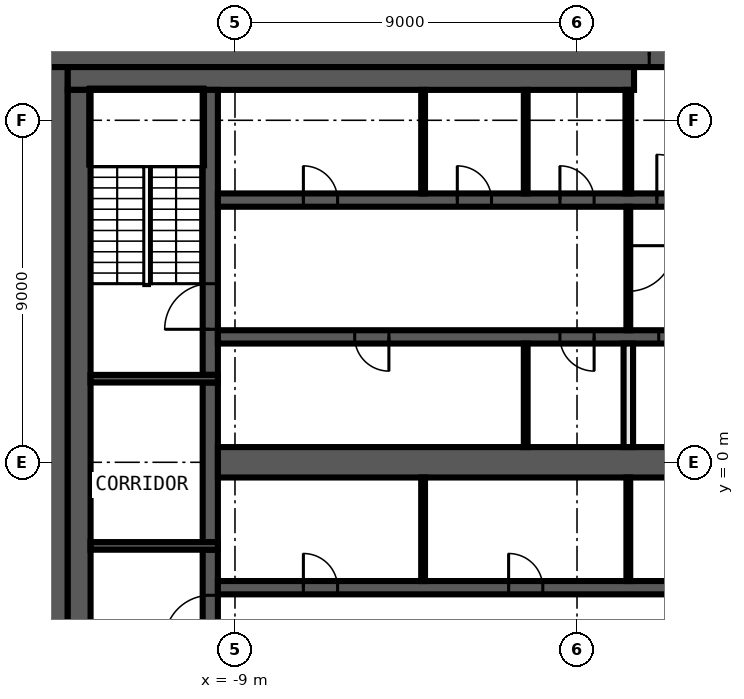
"""IFC4 building model, lengths in metres.
Left out: names, types, materials, properties, quantities, classifications, styles, units other than length and angle.
Written with IfcOpenShell. Run it as: python <this file> out.ifc"""

import sys

from ifc_helpers import new_model, si_unit, direction, frame, frame_2d, origin, place, context, subcontext, project, spatial, rectangle, extrude, element, fill, save


model = new_model("IFC4")
c1 = context("Model", 3, precision=1e-05, world=origin(), true_north=direction((0.0, 1.0)))
c2 = subcontext(c1, "Body", "Model", "MODEL_VIEW")
j1 = project(units=[si_unit("LENGTHUNIT", "METRE"), si_unit("PLANEANGLEUNIT", "RADIAN")], contexts=[c1])
p1 = place(None, origin())
s1 = spatial("IfcSite", under=j1, at=p1, CompositionType="ELEMENT")
p2 = place(p1, origin())
s2 = spatial("IfcBuilding", under=s1, at=p2, CompositionType="ELEMENT")
p3 = place(p2, frame((0.0, 0.0, 323.6)))
s3 = spatial("IfcBuildingStorey", under=s2, at=p3, CompositionType="ELEMENT", Elevation=323.6)
p4 = place(p3, frame((-14.0, 10.7, 0.0), z_axis=(0.0, 0.0, 1.0), x_axis=(1.0, 0.0, 0.0)))
e1 = element("IfcWall", 1, at=p4, inside=s3, PredefinedType="SHEAR", context=c2, shape_type="SweptSolid", body=[
    extrude(rectangle(XDim=28.0, YDim=0.6, at=frame_2d((14.0, 0.0))), origin(), (0.0, 0.0, 1.0), 3.82),
])
p5 = place(p4, frame((15.9, 0.0, 0.0)))
e2 = element("IfcOpeningElement", 2, at=p5, cuts=e1, PredefinedType="OPENING", context=c2, shape_type="SweptSolid", body=[
    extrude(rectangle(XDim=1.6, YDim=2.1, at=frame_2d((0.8, 1.05))), frame((0.0, 0.31, 0.0), z_axis=(0.0, -1.0, 0.0), x_axis=(1.0, 0.0, 0.0)), (0.0, 0.0, 1.0), 0.62),
])
p6 = place(p3, frame((-13.7, -10.4, 0.0), z_axis=(0.0, 0.0, 1.0), x_axis=(0.0, 1.0, 0.0)))
e3 = element("IfcWall", 3, at=p6, inside=s3, PredefinedType="SHEAR", context=c2, shape_type="SweptSolid", body=[
    extrude(rectangle(XDim=20.8, YDim=0.6, at=frame_2d((10.4, 0.0))), origin(), (0.0, 0.0, 1.0), 3.82),
])
p7 = place(p3, frame((-13.4, 10.1, 0.0), z_axis=(0.0, 0.0, 1.0), x_axis=(1.0, 0.0, 0.0)))
e4 = element("IfcWall", 4, at=p7, inside=s3, PredefinedType="SHEAR", context=c2, shape_type="SweptSolid", body=[
    extrude(rectangle(XDim=14.9, YDim=0.6, at=frame_2d((7.45, 0.0))), origin(), (0.0, 0.0, 1.0), 3.82),
])
p8 = place(p3, frame((-13.1, -9.8, 0.0), z_axis=(0.0, 0.0, 1.0), x_axis=(0.0, 1.0, 0.0)))
e5 = element("IfcWall", 5, at=p8, inside=s3, PredefinedType="SHEAR", context=c2, shape_type="SweptSolid", body=[
    extrude(rectangle(XDim=19.6, YDim=0.6, at=frame_2d((9.8, 0.0))), origin(), (0.0, 0.0, 1.0), 3.82),
])
p9 = place(p3, frame((-9.65, -9.8, 0.0), z_axis=(0.0, 0.0, 1.0), x_axis=(0.0, 1.0, 0.0)))
e6 = element("IfcWall", 6, at=p9, inside=s3, PredefinedType="SHEAR", context=c2, shape_type="SweptSolid", body=[
    extrude(rectangle(XDim=7.5, YDim=0.4, at=frame_2d((3.75, 0.0))), origin(), (0.0, 0.0, 1.0), 3.82),
])
p10 = place(p9, frame((5.1, 0.0, 0.0)))
e7 = element("IfcOpeningElement", 7, at=p10, cuts=e6, PredefinedType="OPENING", context=c2, shape_type="SweptSolid", body=[
    extrude(rectangle(XDim=1.2, YDim=2.1, at=frame_2d((0.6, 1.05))), frame((0.0, 0.21, 0.0), z_axis=(0.0, -1.0, 0.0), x_axis=(1.0, 0.0, 0.0)), (0.0, 0.0, 1.0), 0.42),
])
p11 = place(p3, frame((-9.65, -2.1, 0.0), z_axis=(0.0, 0.0, 1.0), x_axis=(0.0, 1.0, 0.0)))
e8 = element("IfcWall", 8, at=p11, inside=s3, PredefinedType="SHEAR", context=c2, shape_type="SweptSolid", body=[
    extrude(rectangle(XDim=4.2, YDim=0.4, at=frame_2d((2.1, 0.0))), origin(), (0.0, 0.0, 1.0), 3.82),
])
p12 = place(p3, frame((-9.65, 2.3, 0.0), z_axis=(0.0, 0.0, 1.0), x_axis=(0.0, 1.0, 0.0)))
e9 = element("IfcWall", 9, at=p12, inside=s3, PredefinedType="SHEAR", context=c2, shape_type="SweptSolid", body=[
    extrude(rectangle(XDim=7.5, YDim=0.4, at=frame_2d((3.75, 0.0))), origin(), (0.0, 0.0, 1.0), 3.82),
])
p13 = place(p12, frame((1.2, 0.0, 0.0)))
e10 = element("IfcOpeningElement", 10, at=p13, cuts=e9, PredefinedType="OPENING", context=c2, shape_type="SweptSolid", body=[
    extrude(rectangle(XDim=1.2, YDim=2.1, at=frame_2d((0.6, 1.05))), frame((0.0, 0.21, 0.0), z_axis=(0.0, -1.0, 0.0), x_axis=(1.0, 0.0, 0.0)), (0.0, 0.0, 1.0), 0.42),
])
for number, where, z_axis, x_axis in (
    (11, (-9.45, 2.2, 0.0), (0.0, 0.0, 1.0), (-1.0, 0.0, 0.0)),
    (12, (-9.45, -2.2, 0.0), (0.0, 0.0, 1.0), (-1.0, 0.0, 0.0)),
):
    element("IfcWall", number, at=place(p3, frame(where, z_axis=z_axis, x_axis=x_axis)), inside=s3, PredefinedType="SHEAR", context=c2, shape_type="SweptSolid", body=[
        extrude(rectangle(XDim=3.35, YDim=0.2, at=frame_2d((1.675, 0.0))), origin(), (0.0, 0.0, 1.0), 3.82),
    ])
p14 = place(p3, frame((-9.45, 6.9, 0.0), z_axis=(0.0, 0.0, 1.0), x_axis=(1.0, 0.0, 0.0)))
e13 = element("IfcWall", 13, at=p14, inside=s3, PredefinedType="SHEAR", context=c2, shape_type="SweptSolid", body=[
    extrude(rectangle(XDim=18.9, YDim=0.35, at=frame_2d((9.45, 0.0))), origin(), (0.0, 0.0, 1.0), 3.82),
])
p15 = place(p14, frame((11.55, 0.0, 0.0)))
e14 = element("IfcOpeningElement", 14, at=p15, cuts=e13, PredefinedType="OPENING", context=c2, shape_type="SweptSolid", body=[
    extrude(rectangle(XDim=1.2, YDim=2.1, at=frame_2d((0.6, 1.05))), frame((0.0, 0.185, 0.0), z_axis=(0.0, -1.0, 0.0), x_axis=(1.0, 0.0, 0.0)), (0.0, 0.0, 1.0), 0.37),
])
p16 = place(p14, frame((14.3, 0.0, 0.0)))
e15 = element("IfcOpeningElement", 15, at=p16, cuts=e13, PredefinedType="OPENING", context=c2, shape_type="SweptSolid", body=[
    extrude(rectangle(XDim=1.1, YDim=2.1, at=frame_2d((0.55, 1.05))), frame((0.0, 0.185, 0.0), z_axis=(0.0, -1.0, 0.0), x_axis=(1.0, 0.0, 0.0)), (0.0, 0.0, 1.0), 0.37),
])
p17 = place(p14, frame((17.0, 0.0, 0.0)))
e16 = element("IfcOpeningElement", 16, at=p17, cuts=e13, PredefinedType="OPENING", context=c2, shape_type="SweptSolid", body=[
    extrude(rectangle(XDim=1.1, YDim=2.1, at=frame_2d((0.55, 1.05))), frame((0.0, 0.185, 0.0), z_axis=(0.0, -1.0, 0.0), x_axis=(1.0, 0.0, 0.0)), (0.0, 0.0, 1.0), 0.37),
])
p18 = place(p14, frame((2.25, 0.0, 0.0)))
e17 = element("IfcOpeningElement", 17, at=p18, cuts=e13, PredefinedType="OPENING", context=c2, shape_type="SweptSolid", body=[
    extrude(rectangle(XDim=0.9, YDim=2.1, at=frame_2d((0.45, 1.05))), frame((0.0, 0.185, 0.0), z_axis=(0.0, -1.0, 0.0), x_axis=(1.0, 0.0, 0.0)), (0.0, 0.0, 1.0), 0.37),
])
p19 = place(p14, frame((6.3, 0.0, 0.0)))
e18 = element("IfcOpeningElement", 18, at=p19, cuts=e13, PredefinedType="OPENING", context=c2, shape_type="SweptSolid", body=[
    extrude(rectangle(XDim=0.9, YDim=2.1, at=frame_2d((0.45, 1.05))), frame((0.0, 0.185, 0.0), z_axis=(0.0, -1.0, 0.0), x_axis=(1.0, 0.0, 0.0)), (0.0, 0.0, 1.0), 0.37),
])
p20 = place(p14, frame((9.0, 0.0, 0.0)))
e19 = element("IfcOpeningElement", 19, at=p20, cuts=e13, PredefinedType="OPENING", context=c2, shape_type="SweptSolid", body=[
    extrude(rectangle(XDim=0.9, YDim=2.1, at=frame_2d((0.45, 1.05))), frame((0.0, 0.185, 0.0), z_axis=(0.0, -1.0, 0.0), x_axis=(1.0, 0.0, 0.0)), (0.0, 0.0, 1.0), 0.37),
])
p21 = place(p3, frame((9.45, 3.3, 0.0), z_axis=(0.0, 0.0, 1.0), x_axis=(-1.0, 0.0, 0.0)))
e20 = element("IfcWall", 20, at=p21, inside=s3, PredefinedType="SHEAR", context=c2, shape_type="SweptSolid", body=[
    extrude(rectangle(XDim=18.9, YDim=0.35, at=frame_2d((9.45, 0.0))), origin(), (0.0, 0.0, 1.0), 3.82),
])
p22 = place(p21, frame((6.2, 0.0, 0.0)))
e21 = element("IfcOpeningElement", 21, at=p22, cuts=e20, PredefinedType="OPENING", context=c2, shape_type="SweptSolid", body=[
    extrude(rectangle(XDim=1.1, YDim=2.1, at=frame_2d((0.55, 1.05))), frame((0.0, 0.185, 0.0), z_axis=(0.0, -1.0, 0.0), x_axis=(1.0, 0.0, 0.0)), (0.0, 0.0, 1.0), 0.37),
])
p23 = place(p21, frame((3.5, 0.0, 0.0)))
e22 = element("IfcOpeningElement", 22, at=p23, cuts=e20, PredefinedType="OPENING", context=c2, shape_type="SweptSolid", body=[
    extrude(rectangle(XDim=1.1, YDim=2.1, at=frame_2d((0.55, 1.05))), frame((0.0, 0.185, 0.0), z_axis=(0.0, -1.0, 0.0), x_axis=(1.0, 0.0, 0.0)), (0.0, 0.0, 1.0), 0.37),
])
p24 = place(p21, frame((0.9, 0.0, 0.0)))
e23 = element("IfcOpeningElement", 23, at=p24, cuts=e20, PredefinedType="OPENING", context=c2, shape_type="SweptSolid", body=[
    extrude(rectangle(XDim=0.9, YDim=2.1, at=frame_2d((0.45, 1.05))), frame((0.0, 0.185, 0.0), z_axis=(0.0, -1.0, 0.0), x_axis=(1.0, 0.0, 0.0)), (0.0, 0.0, 1.0), 0.37),
])
p25 = place(p21, frame((14.4, 0.0, 0.0)))
e24 = element("IfcOpeningElement", 24, at=p25, cuts=e20, PredefinedType="OPENING", context=c2, shape_type="SweptSolid", body=[
    extrude(rectangle(XDim=0.9, YDim=2.1, at=frame_2d((0.45, 1.05))), frame((0.0, 0.185, 0.0), z_axis=(0.0, -1.0, 0.0), x_axis=(1.0, 0.0, 0.0)), (0.0, 0.0, 1.0), 0.37),
])
p26 = place(p21, frame((9.0, 0.0, 0.0)))
e25 = element("IfcOpeningElement", 25, at=p26, cuts=e20, PredefinedType="OPENING", context=c2, shape_type="SweptSolid", body=[
    extrude(rectangle(XDim=0.9, YDim=2.1, at=frame_2d((0.45, 1.05))), frame((0.0, 0.185, 0.0), z_axis=(0.0, -1.0, 0.0), x_axis=(1.0, 0.0, 0.0)), (0.0, 0.0, 1.0), 0.37),
])
p27 = place(p3, frame((-9.45, -3.3, 0.0), z_axis=(0.0, 0.0, 1.0), x_axis=(1.0, 0.0, 0.0)))
e26 = element("IfcWall", 26, at=p27, inside=s3, PredefinedType="SHEAR", context=c2, shape_type="SweptSolid", body=[
    extrude(rectangle(XDim=18.9, YDim=0.35, at=frame_2d((9.45, 0.0))), origin(), (0.0, 0.0, 1.0), 3.82),
])
p28 = place(p27, frame((17.0, 0.0, 0.0)))
e27 = element("IfcOpeningElement", 27, at=p28, cuts=e26, PredefinedType="OPENING", context=c2, shape_type="SweptSolid", body=[
    extrude(rectangle(XDim=1.1, YDim=2.1, at=frame_2d((0.55, 1.05))), frame((0.0, 0.185, 0.0), z_axis=(0.0, -1.0, 0.0), x_axis=(1.0, 0.0, 0.0)), (0.0, 0.0, 1.0), 0.37),
])
p29 = place(p27, frame((2.25, 0.0, 0.0)))
e28 = element("IfcOpeningElement", 28, at=p29, cuts=e26, PredefinedType="OPENING", context=c2, shape_type="SweptSolid", body=[
    extrude(rectangle(XDim=0.9, YDim=2.1, at=frame_2d((0.45, 1.05))), frame((0.0, 0.185, 0.0), z_axis=(0.0, -1.0, 0.0), x_axis=(1.0, 0.0, 0.0)), (0.0, 0.0, 1.0), 0.37),
])
p30 = place(p27, frame((7.65, 0.0, 0.0)))
e29 = element("IfcOpeningElement", 29, at=p30, cuts=e26, PredefinedType="OPENING", context=c2, shape_type="SweptSolid", body=[
    extrude(rectangle(XDim=0.9, YDim=2.1, at=frame_2d((0.45, 1.05))), frame((0.0, 0.185, 0.0), z_axis=(0.0, -1.0, 0.0), x_axis=(1.0, 0.0, 0.0)), (0.0, 0.0, 1.0), 0.37),
])
p31 = place(p27, frame((13.05, 0.0, 0.0)))
e30 = element("IfcOpeningElement", 30, at=p31, cuts=e26, PredefinedType="OPENING", context=c2, shape_type="SweptSolid", body=[
    extrude(rectangle(XDim=0.9, YDim=2.1, at=frame_2d((0.45, 1.05))), frame((0.0, 0.185, 0.0), z_axis=(0.0, -1.0, 0.0), x_axis=(1.0, 0.0, 0.0)), (0.0, 0.0, 1.0), 0.37),
])
p32 = place(p3, frame((-9.45, 0.0, 0.0), z_axis=(0.0, 0.0, 1.0), x_axis=(1.0, 0.0, 0.0)))
e31 = element("IfcWall", 31, at=p32, inside=s3, PredefinedType="SHEAR", context=c2, shape_type="SweptSolid", body=[
    extrude(rectangle(XDim=18.9, YDim=0.8, at=frame_2d((9.45, 0.0))), origin(), (0.0, 0.0, 1.0), 3.82),
])
p33 = place(p3, frame((1.35, 7.075, 0.0), z_axis=(0.0, 0.0, 1.0), x_axis=(0.0, 1.0, 0.0)))
e32 = element("IfcWall", 32, at=p33, inside=s3, PredefinedType="PARTITIONING", context=c2, shape_type="SweptSolid", body=[
    extrude(rectangle(XDim=2.725, YDim=0.15, at=frame_2d((1.363, 0.0))), origin(), (0.0, 0.0, 1.0), 3.82),
])
p34 = place(p3, frame((1.35, -3.125, 0.0), z_axis=(0.0, 0.0, 1.0), x_axis=(0.0, 1.0, 0.0)))
e33 = element("IfcWall", 33, at=p34, inside=s3, PredefinedType="PARTITIONING", context=c2, shape_type="SweptSolid", body=[
    extrude(rectangle(XDim=2.725, YDim=0.1, at=frame_2d((1.363, 0.0))), origin(), (0.0, 0.0, 1.0), 3.82),
])
p35 = place(p3, frame((1.35, 6.725, 0.0), z_axis=(0.0, 0.0, 1.0), x_axis=(0.0, -1.0, 0.0)))
e34 = element("IfcWall", 34, at=p35, inside=s3, PredefinedType="PARTITIONING", context=c2, shape_type="SweptSolid", body=[
    extrude(rectangle(XDim=3.25, YDim=0.1, at=frame_2d((1.625, 0.0))), origin(), (0.0, 0.0, 1.0), 3.82),
])
p36 = place(p35, frame((1.025, 0.0, 0.0)))
e35 = element("IfcOpeningElement", 35, at=p36, cuts=e34, PredefinedType="OPENING", context=c2, shape_type="SweptSolid", body=[
    extrude(rectangle(XDim=1.2, YDim=2.1, at=frame_2d((0.6, 1.05))), frame((0.0, 0.06, 0.0), z_axis=(0.0, -1.0, 0.0), x_axis=(1.0, 0.0, 0.0)), (0.0, 0.0, 1.0), 0.12),
])
p37 = place(p3, frame((1.35, 0.4, 0.0), z_axis=(0.0, 0.0, 1.0), x_axis=(0.0, 1.0, 0.0)))
e36 = element("IfcWall", 36, at=p37, inside=s3, PredefinedType="SOLIDWALL", context=c2, shape_type="SweptSolid", body=[
    extrude(rectangle(XDim=2.725, YDim=0.25, at=frame_2d((1.363, 0.0))), origin(), (0.0, 0.0, 1.0), 3.82),
])
for number, where, z_axis, x_axis in (
    (37, (-1.35, 0.4, 0.0), (0.0, 0.0, 1.0), (0.0, 1.0, 0.0)),
    (38, (-1.35, 7.075, 0.0), (0.0, 0.0, 1.0), (0.0, 1.0, 0.0)),
    (39, (-4.05, -3.125, 0.0), (0.0, 0.0, 1.0), (0.0, 1.0, 0.0)),
    (40, (-4.05, 7.075, 0.0), (0.0, 0.0, 1.0), (0.0, 1.0, 0.0)),
):
    element("IfcWall", number, at=place(p3, frame(where, z_axis=z_axis, x_axis=x_axis)), inside=s3, PredefinedType="PARTITIONING", context=c2, shape_type="SweptSolid", body=[
        extrude(rectangle(XDim=2.725, YDim=0.1, at=frame_2d((1.363, 0.0))), origin(), (0.0, 0.0, 1.0), 3.82),
    ])
p38 = place(p5, origin())
e41 = element("IfcDoor", 41, at=p38, inside=s3, OperationType="DOUBLE_DOOR_SINGLE_SWING", PredefinedType="DOOR", context=c2, shape_type="SweptSolid", body=[
    extrude(rectangle(XDim=1.6, YDim=2.1, at=frame_2d((0.8, 1.05))), frame((0.0, 0.025, 0.0), z_axis=(0.0, -1.0, 0.0), x_axis=(1.0, 0.0, 0.0)), (0.0, 0.0, 1.0), 0.05),
])
fill(e2, e41)
p39 = place(p15, origin())
e42 = element("IfcDoor", 42, at=p39, inside=s3, OperationType="SINGLE_SWING_LEFT", PredefinedType="DOOR", context=c2, shape_type="SweptSolid", body=[
    extrude(rectangle(XDim=1.2, YDim=2.1, at=frame_2d((0.6, 1.05))), frame((0.0, 0.025, 0.0), z_axis=(0.0, -1.0, 0.0), x_axis=(1.0, 0.0, 0.0)), (0.0, 0.0, 1.0), 0.05),
])
fill(e14, e42)
p40 = place(p22, origin())
e43 = element("IfcDoor", 43, at=p40, inside=s3, OperationType="DOUBLE_DOOR_SLIDING", PredefinedType="DOOR", context=c2, shape_type="SweptSolid", body=[
    extrude(rectangle(XDim=1.1, YDim=2.1, at=frame_2d((0.55, 1.05))), frame((0.0, 0.025, 0.0), z_axis=(0.0, -1.0, 0.0), x_axis=(1.0, 0.0, 0.0)), (0.0, 0.0, 1.0), 0.05),
])
fill(e21, e43)
p41 = place(p18, origin())
e44 = element("IfcDoor", 44, at=p41, inside=s3, OperationType="SINGLE_SWING_RIGHT", PredefinedType="DOOR", context=c2, shape_type="SweptSolid", body=[
    extrude(rectangle(XDim=0.9, YDim=2.1, at=frame_2d((0.45, 1.05))), frame((0.0, 0.025, 0.0), z_axis=(0.0, -1.0, 0.0), x_axis=(1.0, 0.0, 0.0)), (0.0, 0.0, 1.0), 0.05),
])
fill(e17, e44)
p42 = place(p19, origin())
e45 = element("IfcDoor", 45, at=p42, inside=s3, OperationType="SINGLE_SWING_LEFT", PredefinedType="DOOR", context=c2, shape_type="SweptSolid", body=[
    extrude(rectangle(XDim=0.9, YDim=2.1, at=frame_2d((0.45, 1.05))), frame((0.0, 0.025, 0.0), z_axis=(0.0, -1.0, 0.0), x_axis=(1.0, 0.0, 0.0)), (0.0, 0.0, 1.0), 0.05),
])
fill(e18, e45)
p43 = place(p20, origin())
e46 = element("IfcDoor", 46, at=p43, inside=s3, OperationType="SINGLE_SWING_RIGHT", PredefinedType="DOOR", context=c2, shape_type="SweptSolid", body=[
    extrude(rectangle(XDim=0.9, YDim=2.1, at=frame_2d((0.45, 1.05))), frame((0.0, 0.025, 0.0), z_axis=(0.0, -1.0, 0.0), x_axis=(1.0, 0.0, 0.0)), (0.0, 0.0, 1.0), 0.05),
])
fill(e19, e46)
p44 = place(p25, origin())
e47 = element("IfcDoor", 47, at=p44, inside=s3, OperationType="SINGLE_SWING_LEFT", PredefinedType="DOOR", context=c2, shape_type="SweptSolid", body=[
    extrude(rectangle(XDim=0.9, YDim=2.1, at=frame_2d((0.45, 1.05))), frame((0.0, 0.025, 0.0), z_axis=(0.0, -1.0, 0.0), x_axis=(1.0, 0.0, 0.0)), (0.0, 0.0, 1.0), 0.05),
])
fill(e24, e47)
p45 = place(p26, origin())
e48 = element("IfcDoor", 48, at=p45, inside=s3, OperationType="SINGLE_SWING_RIGHT", PredefinedType="DOOR", context=c2, shape_type="SweptSolid", body=[
    extrude(rectangle(XDim=0.9, YDim=2.1, at=frame_2d((0.45, 1.05))), frame((0.0, 0.025, 0.0), z_axis=(0.0, -1.0, 0.0), x_axis=(1.0, 0.0, 0.0)), (0.0, 0.0, 1.0), 0.05),
])
fill(e25, e48)
p46 = place(p29, origin())
e49 = element("IfcDoor", 49, at=p46, inside=s3, OperationType="SINGLE_SWING_LEFT", PredefinedType="DOOR", context=c2, shape_type="SweptSolid", body=[
    extrude(rectangle(XDim=0.9, YDim=2.1, at=frame_2d((0.45, 1.05))), frame((0.0, 0.025, 0.0), z_axis=(0.0, -1.0, 0.0), x_axis=(1.0, 0.0, 0.0)), (0.0, 0.0, 1.0), 0.05),
])
fill(e28, e49)
p47 = place(p30, origin())
e50 = element("IfcDoor", 50, at=p47, inside=s3, OperationType="SINGLE_SWING_RIGHT", PredefinedType="DOOR", context=c2, shape_type="SweptSolid", body=[
    extrude(rectangle(XDim=0.9, YDim=2.1, at=frame_2d((0.45, 1.05))), frame((0.0, 0.025, 0.0), z_axis=(0.0, -1.0, 0.0), x_axis=(1.0, 0.0, 0.0)), (0.0, 0.0, 1.0), 0.05),
])
fill(e29, e50)
p48 = place(p13, origin())
e51 = element("IfcDoor", 51, at=p48, inside=s3, OperationType="SINGLE_SWING_RIGHT", PredefinedType="DOOR", context=c2, shape_type="SweptSolid", body=[
    extrude(rectangle(XDim=1.2, YDim=2.1, at=frame_2d((0.6, 1.05))), frame((0.0, 0.025, 0.0), z_axis=(0.0, -1.0, 0.0), x_axis=(1.0, 0.0, 0.0)), (0.0, 0.0, 1.0), 0.05),
])
fill(e10, e51)
p49 = place(p10, origin())
e52 = element("IfcDoor", 52, at=p49, inside=s3, OperationType="SINGLE_SWING_LEFT", PredefinedType="DOOR", context=c2, shape_type="SweptSolid", body=[
    extrude(rectangle(XDim=1.2, YDim=2.1, at=frame_2d((0.6, 1.05))), frame((0.0, 0.025, 0.0), z_axis=(0.0, -1.0, 0.0), x_axis=(1.0, 0.0, 0.0)), (0.0, 0.0, 1.0), 0.05),
])
fill(e7, e52)
p50 = place(p36, origin())
e53 = element("IfcDoor", 53, at=p50, inside=s3, OperationType="SINGLE_SWING_LEFT", PredefinedType="DOOR", context=c2, shape_type="SweptSolid", body=[
    extrude(rectangle(XDim=1.2, YDim=2.1, at=frame_2d((0.6, 1.05))), frame((0.0, 0.025, 0.0), z_axis=(0.0, -1.0, 0.0), x_axis=(1.0, 0.0, 0.0)), (0.0, 0.0, 1.0), 0.05),
])
fill(e35, e53)
save(model, sys.argv[1])
